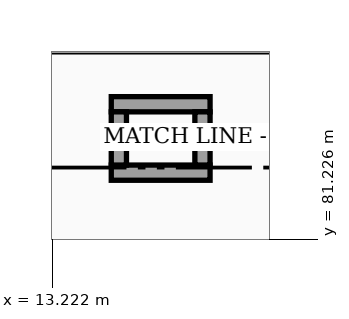
"""IFC4 building model, lengths in metres.
Left out: names, types, materials, properties, quantities, classifications, styles, units other than length and angle.
Written with IfcOpenShell. Run it as: python <this file> out.ifc"""

import sys

from ifc_helpers import new_model, si_unit, direction, frame, frame_2d, origin, place, context, subcontext, project, spatial, rectangle, extrude, element, save


model = new_model("IFC4")
c1 = context("Model", 3, precision=1e-05, world=origin(), true_north=direction((0.0, 1.0)))
c2 = subcontext(c1, "Body", "Model", "MODEL_VIEW")
j1 = project(units=[si_unit("LENGTHUNIT", "METRE"), si_unit("PLANEANGLEUNIT", "RADIAN")], contexts=[c1])
p1 = place(None, origin())
s1 = spatial("IfcSite", under=j1, at=p1, CompositionType="ELEMENT")
p2 = place(p1, origin())
s2 = spatial("IfcBuilding", under=s1, at=p2, CompositionType="ELEMENT")
p3 = place(p2, origin())
s3 = spatial("IfcBuildingStorey", under=s2, at=p3, CompositionType="ELEMENT", Elevation=0.0)
for number, where, z_axis, x_axis in (
    (1, (15.3, 82.1, 0.0), (0.0, 0.0, 1.0), (-1.0, 0.0, 0.0)),
    (2, (14.0, 83.0, 0.0), (0.0, 0.0, 1.0), (1.0, 0.0, 0.0)),
):
    element("IfcWall", number, at=place(p3, frame(where, z_axis=z_axis, x_axis=x_axis)), inside=s3, PredefinedType="PARTITIONING", context=c2, shape_type="SweptSolid", body=[
        extrude(rectangle(XDim=1.3, YDim=0.2, at=frame_2d((0.65, 0.0))), origin(), (0.0, 0.0, 1.0), 4.24),
    ])
for number, where, z_axis, x_axis in (
    (3, (14.1, 82.2, 0.0), (0.0, 0.0, 1.0), (0.0, 1.0, 0.0)),
    (4, (15.2, 82.9, 0.0), (0.0, 0.0, 1.0), (0.0, -1.0, 0.0)),
):
    element("IfcWall", number, at=place(p3, frame(where, z_axis=z_axis, x_axis=x_axis)), inside=s3, PredefinedType="PARTITIONING", context=c2, shape_type="SweptSolid", body=[
        extrude(rectangle(XDim=0.7, YDim=0.2, at=frame_2d((0.35, 0.0))), origin(), (0.0, 0.0, 1.0), 4.24),
    ])
save(model, sys.argv[1])
